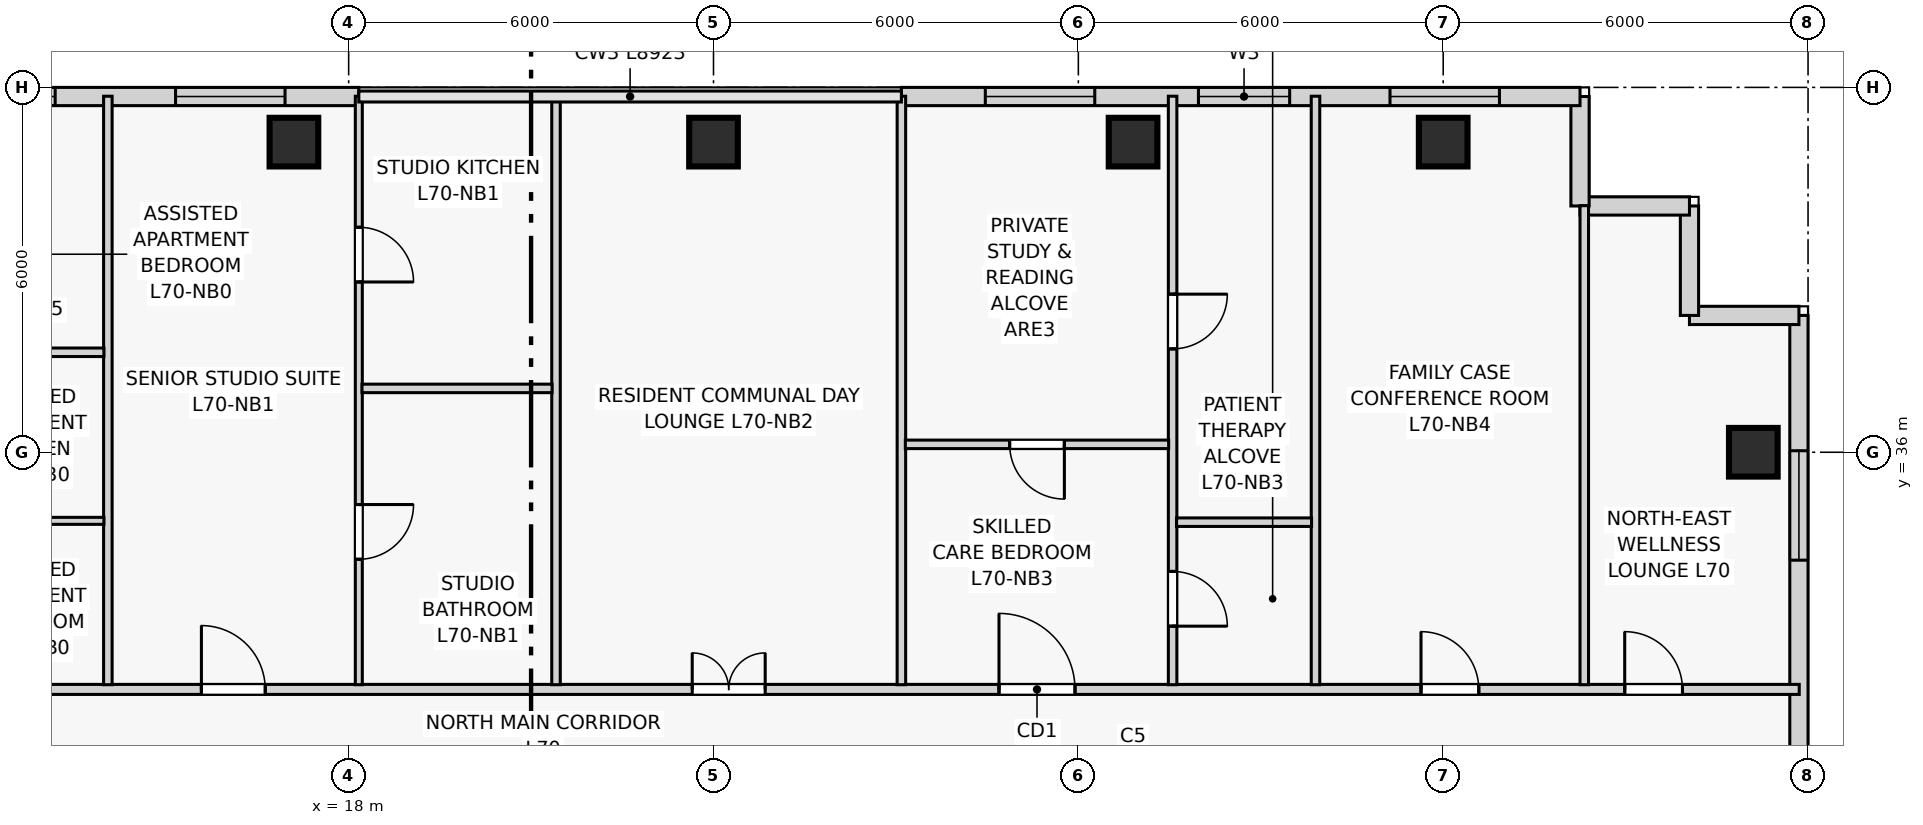
"""IFC4 building model, lengths in metres.
Left out: names, types, materials, properties, quantities, classifications, styles, units other than length and angle.
Written with IfcOpenShell. Run it as: python <this file> out.ifc"""

import sys

from ifc_helpers import new_model, si_unit, direction, frame, frame_2d, origin, origin_2d, place, context, subcontext, project, spatial, rectangle, extrude, source, transform, mapped, element, fill, save


model = new_model("IFC4")
c1 = context("Model", 3, precision=1e-05, world=origin(), true_north=direction((0.0, 1.0)))
c2 = subcontext(c1, "Body", "Model", "MODEL_VIEW")
j1 = project(units=[si_unit("LENGTHUNIT", "METRE"), si_unit("PLANEANGLEUNIT", "RADIAN")], contexts=[c1])
p1 = place(None, origin())
s1 = spatial("IfcSite", under=j1, at=p1, CompositionType="ELEMENT")
p2 = place(p1, origin())
s2 = spatial("IfcBuilding", under=s1, at=p2, CompositionType="ELEMENT")
p3 = place(p2, frame((0.0, 0.0, 267.3)))
s3 = spatial("IfcBuildingStorey", under=s2, at=p3, CompositionType="ELEMENT", Elevation=267.3)
m1 = source(origin(), c2, "Body", "SweptSolid", [
    extrude(rectangle(XDim=0.8, YDim=0.8, at=origin_2d()), origin(), (0.0, 0.0, 1.0), 3.6),
])
for number, where, z_axis, x_axis in (
    (1, (17.1, 41.1, 0.0), (0.0, 0.0, 1.0), (1.0, 0.0, 0.0)),
    (2, (24.0, 41.1, 0.0), (0.0, 0.0, 1.0), (1.0, 0.0, 0.0)),
    (3, (30.9, 41.1, 0.0), (0.0, 0.0, 1.0), (1.0, 0.0, 0.0)),
    (4, (36.0, 41.1, 0.0), (0.0, 0.0, 1.0), (1.0, 0.0, 0.0)),
    (5, (41.1, 36.0, 0.0), (0.0, 0.0, 1.0), (1.0, 0.0, 0.0)),
):
    element("IfcColumn", number, at=place(p3, frame(where, z_axis=z_axis, x_axis=x_axis)), inside=s3, PredefinedType="COLUMN", context=c2, shape_type="MappedRepresentation", body=[
        mapped(m1, transform((0.0, 0.0, 0.0), scale=1.0)),
    ])
p4 = place(p3, frame((41.85, 27.54, 0.0), z_axis=(0.0, 0.0, 1.0), x_axis=(0.0, 1.0, 0.0)))
e6 = element("IfcWall", 6, at=p4, inside=s3, PredefinedType="SOLIDWALL", context=c2, shape_type="SweptSolid", body=[
    extrude(rectangle(XDim=10.71, YDim=0.3, at=frame_2d((5.355, 0.0))), origin(), (0.0, 0.0, 1.0), 3.32),
])
p5 = place(p4, frame((1.43, 0.0, 0.8)))
e7 = element("IfcOpeningElement", 7, at=p5, cuts=e6, PredefinedType="OPENING", context=c2, shape_type="SweptSolid", body=[
    extrude(rectangle(XDim=1.8, YDim=2.1, at=frame_2d((0.9, 1.05))), frame((0.0, 0.16, 0.0), z_axis=(0.0, -1.0, 0.0), x_axis=(1.0, 0.0, 0.0)), (0.0, 0.0, 1.0), 0.32),
])
p6 = place(p4, frame((6.685, 0.0, 0.8)))
e8 = element("IfcOpeningElement", 8, at=p6, cuts=e6, PredefinedType="OPENING", context=c2, shape_type="SweptSolid", body=[
    extrude(rectangle(XDim=1.8, YDim=2.1, at=frame_2d((0.9, 1.05))), frame((0.0, 0.16, 0.0), z_axis=(0.0, -1.0, 0.0), x_axis=(1.0, 0.0, 0.0)), (0.0, 0.0, 1.0), 0.32),
])
for number, where, z_axis, x_axis in (
    (9, (41.85, 38.25, 0.0), (0.0, 0.0, 1.0), (-1.0, 0.0, 0.0)),
    (10, (40.05, 38.25, 0.0), (0.0, 0.0, 1.0), (0.0, 1.0, 0.0)),
    (11, (40.05, 40.05, 0.0), (0.0, 0.0, 1.0), (-1.0, 0.0, 0.0)),
    (12, (38.25, 40.05, 0.0), (0.0, 0.0, 1.0), (0.0, 1.0, 0.0)),
):
    element("IfcWall", number, at=place(p3, frame(where, z_axis=z_axis, x_axis=x_axis)), inside=s3, PredefinedType="SOLIDWALL", context=c2, shape_type="SweptSolid", body=[
        extrude(rectangle(XDim=1.8, YDim=0.3, at=frame_2d((0.9, 0.0))), origin(), (0.0, 0.0, 1.0), 3.32),
    ])
p7 = place(p3, frame((38.25, 41.85, 0.0), z_axis=(0.0, 0.0, 1.0), x_axis=(-1.0, 0.0, 0.0)))
e13 = element("IfcWall", 13, at=p7, inside=s3, PredefinedType="SOLIDWALL", context=c2, shape_type="SweptSolid", body=[
    extrude(rectangle(XDim=11.16, YDim=0.3, at=frame_2d((5.58, 0.0))), origin(), (0.0, 0.0, 1.0), 3.32),
])
p8 = place(p7, frame((1.325, 0.0, 0.8)))
e14 = element("IfcOpeningElement", 14, at=p8, cuts=e13, PredefinedType="OPENING", context=c2, shape_type="SweptSolid", body=[
    extrude(rectangle(XDim=1.8, YDim=2.1, at=frame_2d((0.9, 1.05))), frame((0.0, 0.16, 0.0), z_axis=(0.0, -1.0, 0.0), x_axis=(1.0, 0.0, 0.0)), (0.0, 0.0, 1.0), 0.32),
])
p9 = place(p7, frame((4.775, 0.0, 0.85)))
e15 = element("IfcOpeningElement", 15, at=p9, cuts=e13, PredefinedType="OPENING", context=c2, shape_type="SweptSolid", body=[
    extrude(rectangle(XDim=1.5, YDim=1.8, at=frame_2d((0.75, 0.9))), frame((0.0, 0.16, 0.0), z_axis=(0.0, -1.0, 0.0), x_axis=(1.0, 0.0, 0.0)), (0.0, 0.0, 1.0), 0.32),
])
p10 = place(p7, frame((7.98, 0.0, 0.8)))
e16 = element("IfcOpeningElement", 16, at=p10, cuts=e13, PredefinedType="OPENING", context=c2, shape_type="SweptSolid", body=[
    extrude(rectangle(XDim=1.8, YDim=2.1, at=frame_2d((0.9, 1.05))), frame((0.0, 0.16, 0.0), z_axis=(0.0, -1.0, 0.0), x_axis=(1.0, 0.0, 0.0)), (0.0, 0.0, 1.0), 0.32),
])
p11 = place(p3, frame((18.167, 41.85, 0.0), z_axis=(0.0, 0.0, 1.0), x_axis=(-1.0, 0.0, 0.0)))
e17 = element("IfcWall", 17, at=p11, inside=s3, PredefinedType="SOLIDWALL", context=c2, shape_type="SweptSolid", body=[
    extrude(rectangle(XDim=11.417, YDim=0.3, at=frame_2d((5.708, 0.0))), origin(), (0.0, 0.0, 1.0), 3.32),
])
p12 = place(p11, frame((1.213, 0.0, 0.8)))
e18 = element("IfcOpeningElement", 18, at=p12, cuts=e17, PredefinedType="OPENING", context=c2, shape_type="SweptSolid", body=[
    extrude(rectangle(XDim=1.8, YDim=2.1, at=frame_2d((0.9, 1.05))), frame((0.0, 0.16, 0.0), z_axis=(0.0, -1.0, 0.0), x_axis=(1.0, 0.0, 0.0)), (0.0, 0.0, 1.0), 0.32),
])
p13 = place(p11, frame((4.993, 0.0, 0.8)))
e19 = element("IfcOpeningElement", 19, at=p13, cuts=e17, PredefinedType="OPENING", context=c2, shape_type="SweptSolid", body=[
    extrude(rectangle(XDim=1.8, YDim=2.1, at=frame_2d((0.9, 1.05))), frame((0.0, 0.16, 0.0), z_axis=(0.0, -1.0, 0.0), x_axis=(1.0, 0.0, 0.0)), (0.0, 0.0, 1.0), 0.32),
])
p14 = place(p11, frame((8.588, 0.0, 0.8)))
e20 = element("IfcOpeningElement", 20, at=p14, cuts=e17, PredefinedType="OPENING", context=c2, shape_type="SweptSolid", body=[
    extrude(rectangle(XDim=1.8, YDim=2.1, at=frame_2d((0.9, 1.05))), frame((0.0, 0.16, 0.0), z_axis=(0.0, -1.0, 0.0), x_axis=(1.0, 0.0, 0.0)), (0.0, 0.0, 1.0), 0.32),
])
p15 = place(p3, frame((3.145, 32.1, 0.0), z_axis=(0.0, 0.0, 1.0), x_axis=(1.0, 0.0, 0.0)))
e21 = element("IfcWall", 21, at=p15, inside=s3, PredefinedType="PARTITIONING", context=c2, shape_type="SweptSolid", body=[
    extrude(rectangle(XDim=38.71, YDim=0.165, at=frame_2d((19.355, 0.0))), origin(), (0.0, 0.0, 1.0), 3.32),
])
p16 = place(p15, frame((4.924, 0.0, 0.0)))
e22 = element("IfcOpeningElement", 22, at=p16, cuts=e21, PredefinedType="OPENING", context=c2, shape_type="SweptSolid", body=[
    extrude(rectangle(XDim=1.05, YDim=2.15, at=frame_2d((0.525, 1.075))), frame((0.0, 0.093, 0.0), z_axis=(0.0, -1.0, 0.0), x_axis=(1.0, 0.0, 0.0)), (0.0, 0.0, 1.0), 0.185),
])
p17 = place(p15, frame((12.434, 0.0, 0.0)))
e23 = element("IfcOpeningElement", 23, at=p17, cuts=e21, PredefinedType="OPENING", context=c2, shape_type="SweptSolid", body=[
    extrude(rectangle(XDim=1.05, YDim=2.15, at=frame_2d((0.525, 1.075))), frame((0.0, 0.093, 0.0), z_axis=(0.0, -1.0, 0.0), x_axis=(1.0, 0.0, 0.0)), (0.0, 0.0, 1.0), 0.185),
])
p18 = place(p15, frame((20.505, 0.0, 0.0)))
e24 = element("IfcOpeningElement", 24, at=p18, cuts=e21, PredefinedType="OPENING", context=c2, shape_type="SweptSolid", body=[
    extrude(rectangle(XDim=1.2, YDim=2.2, at=frame_2d((0.6, 1.1))), frame((0.0, 0.093, 0.0), z_axis=(0.0, -1.0, 0.0), x_axis=(1.0, 0.0, 0.0)), (0.0, 0.0, 1.0), 0.185),
])
p19 = place(p15, frame((25.55, 0.0, 0.0)))
e25 = element("IfcOpeningElement", 25, at=p19, cuts=e21, PredefinedType="OPENING", context=c2, shape_type="SweptSolid", body=[
    extrude(rectangle(XDim=1.25, YDim=2.2, at=frame_2d((0.625, 1.1))), frame((0.0, 0.093, 0.0), z_axis=(0.0, -1.0, 0.0), x_axis=(1.0, 0.0, 0.0)), (0.0, 0.0, 1.0), 0.185),
])
p20 = place(p15, frame((32.49, 0.0, 0.0)))
e26 = element("IfcOpeningElement", 26, at=p20, cuts=e21, PredefinedType="OPENING", context=c2, shape_type="SweptSolid", body=[
    extrude(rectangle(XDim=0.95, YDim=2.1, at=frame_2d((0.475, 1.05))), frame((0.0, 0.093, 0.0), z_axis=(0.0, -1.0, 0.0), x_axis=(1.0, 0.0, 0.0)), (0.0, 0.0, 1.0), 0.185),
])
p21 = place(p15, frame((1.92, 0.0, 0.0)))
e27 = element("IfcOpeningElement", 27, at=p21, cuts=e21, PredefinedType="OPENING", context=c2, shape_type="SweptSolid", body=[
    extrude(rectangle(XDim=0.95, YDim=2.1, at=frame_2d((0.475, 1.05))), frame((0.0, 0.093, 0.0), z_axis=(0.0, -1.0, 0.0), x_axis=(1.0, 0.0, 0.0)), (0.0, 0.0, 1.0), 0.185),
])
p22 = place(p15, frame((35.84, 0.0, 0.0)))
e28 = element("IfcOpeningElement", 28, at=p22, cuts=e21, PredefinedType="OPENING", context=c2, shape_type="SweptSolid", body=[
    extrude(rectangle(XDim=0.95, YDim=2.1, at=frame_2d((0.475, 1.05))), frame((0.0, 0.093, 0.0), z_axis=(0.0, -1.0, 0.0), x_axis=(1.0, 0.0, 0.0)), (0.0, 0.0, 1.0), 0.185),
])
for number, where, z_axis, x_axis in (
    (29, (14.04, 32.177, 0.0), (0.0, 0.0, 1.0), (0.0, 1.0, 0.0)),
    (30, (21.41, 32.177, 0.0), (0.0, 0.0, 1.0), (0.0, 1.0, 0.0)),
    (31, (27.09, 32.177, 0.0), (0.0, 0.0, 1.0), (0.0, 1.0, 0.0)),
    (32, (33.9, 32.177, 0.0), (0.0, 0.0, 1.0), (0.0, 1.0, 0.0)),
):
    element("IfcWall", number, at=place(p3, frame(where, z_axis=z_axis, x_axis=x_axis)), inside=s3, PredefinedType="PARTITIONING", context=c2, shape_type="SweptSolid", body=[
        extrude(rectangle(XDim=9.677, YDim=0.14, at=frame_2d((4.839, 0.0))), origin(), (0.0, 0.0, 1.0), 3.32),
    ])
p23 = place(p3, frame((38.32, 32.177, 0.0), z_axis=(0.0, 0.0, 1.0), x_axis=(0.0, 1.0, 0.0)))
e33 = element("IfcWall", 33, at=p23, inside=s3, PredefinedType="PARTITIONING", context=c2, shape_type="SweptSolid", body=[
    extrude(rectangle(XDim=7.877, YDim=0.14, at=frame_2d((3.939, 0.0))), origin(), (0.0, 0.0, 1.0), 3.32),
])
p24 = place(p3, frame((10.56, 37.644, 0.0), z_axis=(0.0, 0.0, 1.0), x_axis=(1.0, 0.0, 0.0)))
e34 = element("IfcWall", 34, at=p24, inside=s3, PredefinedType="PLUMBINGWALL", context=c2, shape_type="SweptSolid", body=[
    extrude(rectangle(XDim=3.416, YDim=0.14, at=frame_2d((1.708, 0.0))), origin(), (0.0, 0.0, 1.0), 3.32),
])
p25 = place(p3, frame((10.56, 34.872, 0.0), z_axis=(0.0, 0.0, 1.0), x_axis=(1.0, 0.0, 0.0)))
e35 = element("IfcWall", 35, at=p25, inside=s3, PredefinedType="PARTITIONING", context=c2, shape_type="SweptSolid", body=[
    extrude(rectangle(XDim=3.416, YDim=0.115, at=frame_2d((1.708, 0.0))), origin(), (0.0, 0.0, 1.0), 3.32),
])
p26 = place(p3, frame((18.167, 32.177, 0.0), z_axis=(0.0, 0.0, 1.0), x_axis=(0.0, 1.0, 0.0)))
e36 = element("IfcWall", 36, at=p26, inside=s3, PredefinedType="PARTITIONING", context=c2, shape_type="SweptSolid", body=[
    extrude(rectangle(XDim=9.677, YDim=0.115, at=frame_2d((4.839, 0.0))), origin(), (0.0, 0.0, 1.0), 3.32),
])
p27 = place(p26, frame((6.623, 0.0, 0.0)))
e37 = element("IfcOpeningElement", 37, at=p27, cuts=e36, PredefinedType="OPENING", context=c2, shape_type="SweptSolid", body=[
    extrude(rectangle(XDim=0.9, YDim=2.1, at=frame_2d((0.45, 1.05))), frame((0.0, 0.067, 0.0), z_axis=(0.0, -1.0, 0.0), x_axis=(1.0, 0.0, 0.0)), (0.0, 0.0, 1.0), 0.135),
])
p28 = place(p26, frame((2.062, 0.0, 0.0)))
e38 = element("IfcOpeningElement", 38, at=p28, cuts=e36, PredefinedType="OPENING", context=c2, shape_type="SweptSolid", body=[
    extrude(rectangle(XDim=0.9, YDim=2.1, at=frame_2d((0.45, 1.05))), frame((0.0, 0.067, 0.0), z_axis=(0.0, -1.0, 0.0), x_axis=(1.0, 0.0, 0.0)), (0.0, 0.0, 1.0), 0.135),
])
p29 = place(p3, frame((18.219, 37.05, 0.0), z_axis=(0.0, 0.0, 1.0), x_axis=(1.0, 0.0, 0.0)))
e39 = element("IfcWall", 39, at=p29, inside=s3, PredefinedType="PLUMBINGWALL", context=c2, shape_type="SweptSolid", body=[
    extrude(rectangle(XDim=3.125, YDim=0.14, at=frame_2d((1.563, 0.0))), origin(), (0.0, 0.0, 1.0), 3.32),
])
p30 = place(p3, frame((31.55, 32.177, 0.0), z_axis=(0.0, 0.0, 1.0), x_axis=(0.0, 1.0, 0.0)))
e40 = element("IfcWall", 40, at=p30, inside=s3, PredefinedType="PLUMBINGWALL", context=c2, shape_type="SweptSolid", body=[
    extrude(rectangle(XDim=9.677, YDim=0.14, at=frame_2d((4.839, 0.0))), origin(), (0.0, 0.0, 1.0), 3.32),
])
p31 = place(p30, frame((0.962, 0.0, 0.0)))
e41 = element("IfcOpeningElement", 41, at=p31, cuts=e40, PredefinedType="OPENING", context=c2, shape_type="SweptSolid", body=[
    extrude(rectangle(XDim=0.9, YDim=2.1, at=frame_2d((0.45, 1.05))), frame((0.0, 0.08, 0.0), z_axis=(0.0, -1.0, 0.0), x_axis=(1.0, 0.0, 0.0)), (0.0, 0.0, 1.0), 0.16),
])
p32 = place(p30, frame((5.522, 0.0, 0.0)))
e42 = element("IfcOpeningElement", 42, at=p32, cuts=e40, PredefinedType="OPENING", context=c2, shape_type="SweptSolid", body=[
    extrude(rectangle(XDim=0.9, YDim=2.1, at=frame_2d((0.45, 1.05))), frame((0.0, 0.08, 0.0), z_axis=(0.0, -1.0, 0.0), x_axis=(1.0, 0.0, 0.0)), (0.0, 0.0, 1.0), 0.16),
])
p33 = place(p3, frame((31.615, 34.85, 0.0), z_axis=(0.0, 0.0, 1.0), x_axis=(1.0, 0.0, 0.0)))
e43 = element("IfcWall", 43, at=p33, inside=s3, PredefinedType="PLUMBINGWALL", context=c2, shape_type="SweptSolid", body=[
    extrude(rectangle(XDim=2.22, YDim=0.14, at=frame_2d((1.11, 0.0))), origin(), (0.0, 0.0, 1.0), 3.32),
])
p34 = place(p3, frame((27.155, 36.13, 0.0), z_axis=(0.0, 0.0, 1.0), x_axis=(1.0, 0.0, 0.0)))
e44 = element("IfcWall", 44, at=p34, inside=s3, PredefinedType="PARTITIONING", context=c2, shape_type="SweptSolid", body=[
    extrude(rectangle(XDim=4.33, YDim=0.14, at=frame_2d((2.165, 0.0))), origin(), (0.0, 0.0, 1.0), 2.92),
])
p35 = place(p34, frame((1.715, 0.0, 0.0)))
e45 = element("IfcOpeningElement", 45, at=p35, cuts=e44, PredefinedType="OPENING", context=c2, shape_type="SweptSolid", body=[
    extrude(rectangle(XDim=0.9, YDim=2.1, at=frame_2d((0.45, 1.05))), frame((0.0, 0.08, 0.0), z_axis=(0.0, -1.0, 0.0), x_axis=(1.0, 0.0, 0.0)), (0.0, 0.0, 1.0), 0.16),
])
m2 = source(origin(), c2, "Body", "SweptSolid", [
    extrude(rectangle(XDim=1.8, YDim=2.1, at=frame_2d((0.9, 1.05))), frame((0.0, 0.03, 0.0), z_axis=(0.0, -1.0, 0.0), x_axis=(1.0, 0.0, 0.0)), (0.0, 0.0, 1.0), 0.06),
])
p36 = place(p6, origin())
e46 = element("IfcWindow", 46, at=p36, inside=s3, PartitioningType="SINGLE_PANEL", PredefinedType="WINDOW", context=c2, shape_type="MappedRepresentation", body=[
    mapped(m2, transform((0.0, 0.0, 0.0), scale=1.0)),
])
fill(e8, e46)
p37 = place(p8, origin())
e47 = element("IfcWindow", 47, at=p37, inside=s3, PartitioningType="SINGLE_PANEL", PredefinedType="WINDOW", context=c2, shape_type="MappedRepresentation", body=[
    mapped(m2, transform((0.0, 0.0, 0.0), scale=1.0)),
])
fill(e14, e47)
m3 = source(origin(), c2, "Body", "SweptSolid", [
    extrude(rectangle(XDim=1.5, YDim=1.8, at=frame_2d((0.75, 0.9))), frame((0.0, 0.03, 0.0), z_axis=(0.0, -1.0, 0.0), x_axis=(1.0, 0.0, 0.0)), (0.0, 0.0, 1.0), 0.06),
])
p38 = place(p9, origin())
e48 = element("IfcWindow", 48, at=p38, inside=s3, PartitioningType="SINGLE_PANEL", PredefinedType="WINDOW", context=c2, shape_type="MappedRepresentation", body=[
    mapped(m3, transform((0.0, 0.0, 0.0), scale=1.0)),
])
fill(e15, e48)
p39 = place(p10, origin())
e49 = element("IfcWindow", 49, at=p39, inside=s3, PartitioningType="SINGLE_PANEL", PredefinedType="WINDOW", context=c2, shape_type="MappedRepresentation", body=[
    mapped(m2, transform((0.0, 0.0, 0.0), scale=1.0)),
])
fill(e16, e49)
p40 = place(p12, origin())
e50 = element("IfcWindow", 50, at=p40, inside=s3, PartitioningType="SINGLE_PANEL", PredefinedType="WINDOW", context=c2, shape_type="MappedRepresentation", body=[
    mapped(m2, transform((0.0, 0.0, 0.0), scale=1.0)),
])
fill(e18, e50)
p41 = place(p13, origin())
e51 = element("IfcWindow", 51, at=p41, inside=s3, PartitioningType="SINGLE_PANEL", PredefinedType="WINDOW", context=c2, shape_type="MappedRepresentation", body=[
    mapped(m2, transform((0.0, 0.0, 0.0), scale=1.0)),
])
fill(e19, e51)
m4 = source(origin(), c2, "Body", "SweptSolid", [
    extrude(rectangle(XDim=1.05, YDim=2.15, at=frame_2d((0.525, 1.075))), frame((0.0, 0.025, 0.0), z_axis=(0.0, -1.0, 0.0), x_axis=(1.0, 0.0, 0.0)), (0.0, 0.0, 1.0), 0.05),
])
p42 = place(p17, origin())
e52 = element("IfcDoor", 52, at=p42, inside=s3, OperationType="SINGLE_SWING_LEFT", PredefinedType="DOOR", context=c2, shape_type="MappedRepresentation", body=[
    mapped(m4, transform((0.0, 0.0, 0.0), scale=1.0)),
])
fill(e23, e52)
m5 = source(origin(), c2, "Body", "SweptSolid", [
    extrude(rectangle(XDim=0.9, YDim=2.1, at=frame_2d((0.45, 1.05))), frame((0.0, 0.025, 0.0), z_axis=(0.0, -1.0, 0.0), x_axis=(1.0, 0.0, 0.0)), (0.0, 0.0, 1.0), 0.05),
])
p43 = place(p27, frame((0.9, 0.0, 0.0), z_axis=(0.0, 0.0, 1.0), x_axis=(-1.0, 0.0, 0.0)))
e53 = element("IfcDoor", 53, at=p43, inside=s3, OperationType="SINGLE_SWING_RIGHT", PredefinedType="DOOR", context=c2, shape_type="MappedRepresentation", body=[
    mapped(m5, transform((0.0, 0.0, 0.0), scale=1.0)),
])
fill(e37, e53)
p44 = place(p28, frame((0.9, 0.0, 0.0), z_axis=(0.0, 0.0, 1.0), x_axis=(-1.0, 0.0, 0.0)))
e54 = element("IfcDoor", 54, at=p44, inside=s3, OperationType="SINGLE_SWING_LEFT", PredefinedType="DOOR", context=c2, shape_type="MappedRepresentation", body=[
    mapped(m5, transform((0.0, 0.0, 0.0), scale=1.0)),
])
fill(e38, e54)
m6 = source(origin(), c2, "Body", "SweptSolid", [
    extrude(rectangle(XDim=1.2, YDim=2.2, at=frame_2d((0.6, 1.1))), frame((0.0, 0.025, 0.0), z_axis=(0.0, -1.0, 0.0), x_axis=(1.0, 0.0, 0.0)), (0.0, 0.0, 1.0), 0.05),
])
p45 = place(p18, origin())
e55 = element("IfcDoor", 55, at=p45, inside=s3, OperationType="DOUBLE_DOOR_SINGLE_SWING", PredefinedType="DOOR", context=c2, shape_type="MappedRepresentation", body=[
    mapped(m6, transform((0.0, 0.0, 0.0), scale=1.0)),
])
fill(e24, e55)
m7 = source(origin(), c2, "Body", "SweptSolid", [
    extrude(rectangle(XDim=1.25, YDim=2.2, at=frame_2d((0.625, 1.1))), frame((0.0, 0.025, 0.0), z_axis=(0.0, -1.0, 0.0), x_axis=(1.0, 0.0, 0.0)), (0.0, 0.0, 1.0), 0.05),
])
p46 = place(p19, origin())
e56 = element("IfcDoor", 56, at=p46, inside=s3, OperationType="SINGLE_SWING_LEFT", PredefinedType="DOOR", context=c2, shape_type="MappedRepresentation", body=[
    mapped(m7, transform((0.0, 0.0, 0.0), scale=1.0)),
])
fill(e25, e56)
p47 = place(p31, frame((0.9, 0.0, 0.0), z_axis=(0.0, 0.0, 1.0), x_axis=(-1.0, 0.0, 0.0)))
e57 = element("IfcDoor", 57, at=p47, inside=s3, OperationType="SINGLE_SWING_RIGHT", PredefinedType="DOOR", context=c2, shape_type="MappedRepresentation", body=[
    mapped(m5, transform((0.0, 0.0, 0.0), scale=1.0)),
])
fill(e41, e57)
p48 = place(p32, frame((0.9, 0.0, 0.0), z_axis=(0.0, 0.0, 1.0), x_axis=(-1.0, 0.0, 0.0)))
e58 = element("IfcDoor", 58, at=p48, inside=s3, OperationType="SINGLE_SWING_LEFT", PredefinedType="DOOR", context=c2, shape_type="MappedRepresentation", body=[
    mapped(m5, transform((0.0, 0.0, 0.0), scale=1.0)),
])
fill(e42, e58)
m8 = source(origin(), c2, "Body", "SweptSolid", [
    extrude(rectangle(XDim=0.95, YDim=2.1, at=frame_2d((0.475, 1.05))), frame((0.0, 0.025, 0.0), z_axis=(0.0, -1.0, 0.0), x_axis=(1.0, 0.0, 0.0)), (0.0, 0.0, 1.0), 0.05),
])
p49 = place(p20, origin())
e59 = element("IfcDoor", 59, at=p49, inside=s3, OperationType="SINGLE_SWING_LEFT", PredefinedType="DOOR", context=c2, shape_type="MappedRepresentation", body=[
    mapped(m8, transform((0.0, 0.0, 0.0), scale=1.0)),
])
fill(e26, e59)
p50 = place(p22, origin())
e60 = element("IfcDoor", 60, at=p50, inside=s3, OperationType="SINGLE_SWING_LEFT", PredefinedType="DOOR", context=c2, shape_type="MappedRepresentation", body=[
    mapped(m8, transform((0.0, 0.0, 0.0), scale=1.0)),
])
fill(e28, e60)
p51 = place(p35, frame((0.9, 0.0, 0.0), z_axis=(0.0, 0.0, 1.0), x_axis=(-1.0, 0.0, 0.0)))
e61 = element("IfcDoor", 61, at=p51, inside=s3, OperationType="SINGLE_SWING_LEFT", PredefinedType="DOOR", context=c2, shape_type="MappedRepresentation", body=[
    mapped(m5, transform((0.0, 0.0, 0.0), scale=1.0)),
])
fill(e45, e61)
save(model, sys.argv[1])
